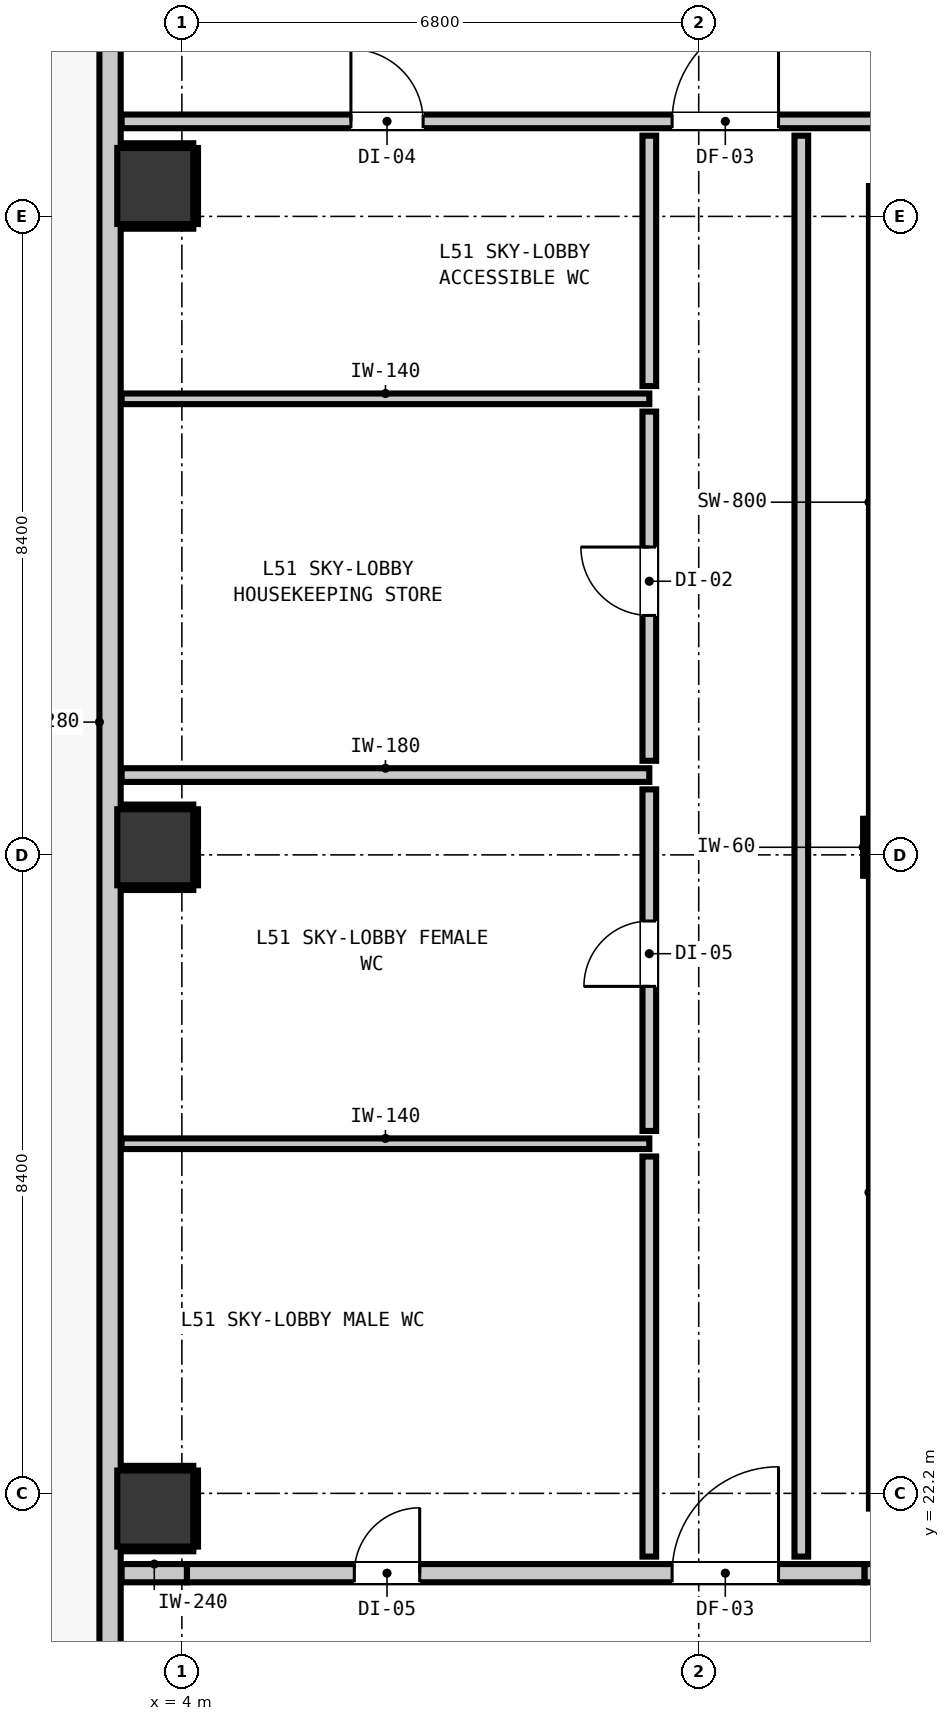
"""IFC4 building model, lengths in metres.
Left out: names, types, materials, properties, quantities, classifications, styles, units other than length and angle.
Written with IfcOpenShell. Run it as: python <this file> out.ifc"""

import sys

from ifc_helpers import new_model, si_unit, direction, frame, frame_2d, origin, origin_2d, place, context, subcontext, project, spatial, rectangle, extrude, element, fill, save


model = new_model("IFC4")
c1 = context("Model", 3, precision=1e-05, world=origin(), true_north=direction((0.0, 1.0)))
c2 = subcontext(c1, "Body", "Model", "MODEL_VIEW")
j1 = project(units=[si_unit("LENGTHUNIT", "METRE"), si_unit("PLANEANGLEUNIT", "RADIAN")], contexts=[c1])
p1 = place(None, origin())
s1 = spatial("IfcSite", under=j1, at=p1, CompositionType="ELEMENT")
p2 = place(p1, origin())
s2 = spatial("IfcBuilding", under=s1, at=p2, CompositionType="ELEMENT")
p3 = place(p2, frame((0.0, 0.0, 176.88)))
s3 = spatial("IfcBuildingStorey", under=s2, at=p3, CompositionType="ELEMENT", Elevation=176.88)
p4 = place(p3, frame((13.4, 30.7, 0.0), z_axis=(0.0, 0.0, 1.0), x_axis=(1.0, 0.0, 0.0)))
e1 = element("IfcColumn", 1, at=p4, inside=s3, PredefinedType="COLUMN", context=c2, shape_type="SweptSolid", body=[
    extrude(rectangle(XDim=0.75, YDim=0.75, at=origin_2d()), origin(), (0.0, 0.0, 1.0), 3.32),
])
p5 = place(p3, frame((13.44, 22.0, 0.0), z_axis=(0.0, 0.0, 1.0), x_axis=(0.0, 1.0, 0.0)))
e2 = element("IfcWall", 2, at=p5, inside=s3, PredefinedType="SHEAR", context=c2, shape_type="SweptSolid", body=[
    extrude(rectangle(XDim=8.32, YDim=0.8, at=frame_2d((4.16, 0.0))), origin(), (0.0, 0.0, 1.0), 3.32),
])
p6 = place(p3, frame((13.44, 31.08, 0.0), z_axis=(0.0, 0.0, 1.0), x_axis=(0.0, 1.0, 0.0)))
e3 = element("IfcWall", 3, at=p6, inside=s3, PredefinedType="SHEAR", context=c2, shape_type="SweptSolid", body=[
    extrude(rectangle(XDim=8.32, YDim=0.8, at=frame_2d((4.16, 0.0))), origin(), (0.0, 0.0, 1.0), 3.32),
])
for number, where, z_axis, x_axis in (
    (4, (3.65, 22.0, 0.0), (0.0, 0.0, 1.0), (1.0, 0.0, 0.0)),
    (5, (3.65, 30.7, 0.0), (0.0, 0.0, 1.0), (1.0, 0.0, 0.0)),
    (6, (3.65, 39.4, 0.0), (0.0, 0.0, 1.0), (1.0, 0.0, 0.0)),
):
    element("IfcColumn", number, at=place(p3, frame(where, z_axis=z_axis, x_axis=x_axis)), inside=s3, PredefinedType="COLUMN", context=c2, shape_type="SweptSolid", body=[
        extrude(rectangle(XDim=1.0, YDim=1.0, at=origin_2d()), origin(), (0.0, 0.0, 1.0), 3.32),
    ])
p7 = place(p3, frame((3.055, 17.555, 0.0), z_axis=(0.0, 0.0, 1.0), x_axis=(0.0, 1.0, 0.0)))
e7 = element("IfcWall", 7, at=p7, inside=s3, PredefinedType="STANDARD", context=c2, shape_type="SweptSolid", body=[
    extrude(rectangle(XDim=32.29, YDim=0.28, at=frame_2d((16.145, 0.0))), origin(), (0.0, 0.0, 1.0), 3.08),
])
p8 = place(p7, frame((29.684, 0.0, 0.0)))
e8 = element("IfcOpeningElement", 8, at=p8, cuts=e7, PredefinedType="OPENING", context=c2, shape_type="SweptSolid", body=[
    extrude(rectangle(XDim=1.0, YDim=2.15, at=frame_2d((0.5, 1.075))), frame((0.0, 0.15, 0.0), z_axis=(0.0, -1.0, 0.0), x_axis=(1.0, 0.0, 0.0)), (0.0, 0.0, 1.0), 0.3),
])
p9 = place(p7, frame((31.092, 0.0, 0.85)))
e9 = element("IfcOpeningElement", 9, at=p9, cuts=e7, PredefinedType="OPENING", context=c2, shape_type="SweptSolid", body=[
    extrude(rectangle(XDim=0.9, YDim=1.5, at=frame_2d((0.45, 0.75))), frame((0.0, 0.15, 0.0), z_axis=(0.0, -1.0, 0.0), x_axis=(1.0, 0.0, 0.0)), (0.0, 0.0, 1.0), 0.3),
])
p10 = place(p3, frame((3.207, 21.15, 0.0), z_axis=(0.0, 0.0, 1.0), x_axis=(1.0, 0.0, 0.0)))
e10 = element("IfcWall", 10, at=p10, inside=s3, PredefinedType="PARTITIONING", context=c2, shape_type="SweptSolid", body=[
    extrude(rectangle(XDim=0.86, YDim=0.24, at=frame_2d((0.43, 0.0))), origin(), (0.0, 0.0, 1.0), 3.08),
])
p11 = place(p3, frame((4.067, 21.15, 0.0), z_axis=(0.0, 0.0, 1.0), x_axis=(1.0, 0.0, 0.0)))
e11 = element("IfcWall", 11, at=p11, inside=s3, PredefinedType="PARTITIONING", context=c2, shape_type="SweptSolid", body=[
    extrude(rectangle(XDim=8.916, YDim=0.24, at=frame_2d((4.458, 0.0))), origin(), (0.0, 0.0, 1.0), 2.565),
])
p12 = place(p11, frame((6.383, 0.0, 0.0)))
e12 = element("IfcOpeningElement", 12, at=p12, cuts=e11, PredefinedType="OPENING", context=c2, shape_type="SweptSolid", body=[
    extrude(rectangle(XDim=1.4, YDim=2.15, at=frame_2d((0.7, 1.075))), frame((0.0, 0.13, 0.0), z_axis=(0.0, -1.0, 0.0), x_axis=(1.0, 0.0, 0.0)), (0.0, 0.0, 1.0), 0.26),
])
p13 = place(p11, frame((2.202, 0.0, 0.0)))
e13 = element("IfcOpeningElement", 13, at=p13, cuts=e11, PredefinedType="OPENING", context=c2, shape_type="SweptSolid", body=[
    extrude(rectangle(XDim=0.86, YDim=2.02, at=frame_2d((0.43, 1.01))), frame((0.0, 0.13, 0.0), z_axis=(0.0, -1.0, 0.0), x_axis=(1.0, 0.0, 0.0)), (0.0, 0.0, 1.0), 0.26),
])
p14 = place(p3, frame((12.983, 21.15, 0.0), z_axis=(0.0, 0.0, 1.0), x_axis=(1.0, 0.0, 0.0)))
e14 = element("IfcWall", 14, at=p14, inside=s3, PredefinedType="PARTITIONING", context=c2, shape_type="SweptSolid", body=[
    extrude(rectangle(XDim=29.61, YDim=0.24, at=frame_2d((14.805, 0.0))), origin(), (0.0, 0.0, 1.0), 3.08),
])
p15 = place(p14, frame((5.227, 0.0, 0.0)))
e15 = element("IfcOpeningElement", 15, at=p15, cuts=e14, PredefinedType="OPENING", context=c2, shape_type="SweptSolid", body=[
    extrude(rectangle(XDim=1.1, YDim=2.15, at=frame_2d((0.55, 1.075))), frame((0.0, 0.13, 0.0), z_axis=(0.0, -1.0, 0.0), x_axis=(1.0, 0.0, 0.0)), (0.0, 0.0, 1.0), 0.26),
])
p16 = place(p14, frame((27.638, 0.0, 0.0)))
e16 = element("IfcOpeningElement", 16, at=p16, cuts=e14, PredefinedType="OPENING", context=c2, shape_type="SweptSolid", body=[
    extrude(rectangle(XDim=0.9, YDim=2.1, at=frame_2d((0.45, 1.05))), frame((0.0, 0.13, 0.0), z_axis=(0.0, -1.0, 0.0), x_axis=(1.0, 0.0, 0.0)), (0.0, 0.0, 1.0), 0.26),
])
p17 = place(p3, frame((3.207, 31.65, 0.0), z_axis=(0.0, 0.0, 1.0), x_axis=(1.0, 0.0, 0.0)))
e17 = element("IfcWall", 17, at=p17, inside=s3, PredefinedType="PARTITIONING", context=c2, shape_type="SweptSolid", body=[
    extrude(rectangle(XDim=6.943, YDim=0.18, at=frame_2d((3.471, 0.0))), origin(), (0.0, 0.0, 1.0), 3.08),
])
p18 = place(p3, frame((3.207, 40.25, 0.0), z_axis=(0.0, 0.0, 1.0), x_axis=(1.0, 0.0, 0.0)))
e18 = element("IfcWall", 18, at=p18, inside=s3, PredefinedType="PARTITIONING", context=c2, shape_type="SweptSolid", body=[
    extrude(rectangle(XDim=39.386, YDim=0.18, at=frame_2d((19.693, 0.0))), origin(), (0.0, 0.0, 1.0), 3.08),
])
p19 = place(p18, frame((14.228, 0.0, 0.0)))
e19 = element("IfcOpeningElement", 19, at=p19, cuts=e18, PredefinedType="OPENING", context=c2, shape_type="SweptSolid", body=[
    extrude(rectangle(XDim=1.4, YDim=2.15, at=frame_2d((0.7, 1.075))), frame((0.0, 0.1, 0.0), z_axis=(0.0, -1.0, 0.0), x_axis=(1.0, 0.0, 0.0)), (0.0, 0.0, 1.0), 0.2),
])
p20 = place(p18, frame((7.243, 0.0, 0.0)))
e20 = element("IfcOpeningElement", 20, at=p20, cuts=e18, PredefinedType="OPENING", context=c2, shape_type="SweptSolid", body=[
    extrude(rectangle(XDim=1.4, YDim=2.15, at=frame_2d((0.7, 1.075))), frame((0.0, 0.1, 0.0), z_axis=(0.0, -1.0, 0.0), x_axis=(1.0, 0.0, 0.0)), (0.0, 0.0, 1.0), 0.2),
])
p21 = place(p18, frame((3.017, 0.0, 0.0)))
e21 = element("IfcOpeningElement", 21, at=p21, cuts=e18, PredefinedType="OPENING", context=c2, shape_type="SweptSolid", body=[
    extrude(rectangle(XDim=0.95, YDim=2.1, at=frame_2d((0.475, 1.05))), frame((0.0, 0.1, 0.0), z_axis=(0.0, -1.0, 0.0), x_axis=(1.0, 0.0, 0.0)), (0.0, 0.0, 1.0), 0.2),
])
for number, where, z_axis, x_axis in (
    (22, (3.207, 26.8, 0.0), (0.0, 0.0, 1.0), (1.0, 0.0, 0.0)),
    (23, (3.207, 36.6, 0.0), (0.0, 0.0, 1.0), (1.0, 0.0, 0.0)),
):
    element("IfcWall", number, at=place(p3, frame(where, z_axis=z_axis, x_axis=x_axis)), inside=s3, PredefinedType="PARTITIONING", context=c2, shape_type="SweptSolid", body=[
        extrude(rectangle(XDim=6.943, YDim=0.14, at=frame_2d((3.471, 0.0))), origin(), (0.0, 0.0, 1.0), 3.08),
    ])
p22 = place(p3, frame((10.15, 21.368, 0.0), z_axis=(0.0, 0.0, 1.0), x_axis=(0.0, 1.0, 0.0)))
e24 = element("IfcWall", 24, at=p22, inside=s3, PredefinedType="PARTITIONING", context=c2, shape_type="SweptSolid", body=[
    extrude(rectangle(XDim=5.264, YDim=0.18, at=frame_2d((2.632, 0.0))), origin(), (0.0, 0.0, 1.0), 3.08),
])
p23 = place(p3, frame((10.15, 26.968, 0.0), z_axis=(0.0, 0.0, 1.0), x_axis=(0.0, 1.0, 0.0)))
e25 = element("IfcWall", 25, at=p23, inside=s3, PredefinedType="PARTITIONING", context=c2, shape_type="SweptSolid", body=[
    extrude(rectangle(XDim=4.494, YDim=0.18, at=frame_2d((2.247, 0.0))), origin(), (0.0, 0.0, 1.0), 3.08),
])
p24 = place(p23, frame((1.902, 0.0, 0.0)))
e26 = element("IfcOpeningElement", 26, at=p24, cuts=e25, PredefinedType="OPENING", context=c2, shape_type="SweptSolid", body=[
    extrude(rectangle(XDim=0.86, YDim=2.02, at=frame_2d((0.43, 1.01))), frame((0.0, 0.1, 0.0), z_axis=(0.0, -1.0, 0.0), x_axis=(1.0, 0.0, 0.0)), (0.0, 0.0, 1.0), 0.2),
])
p25 = place(p3, frame((10.15, 31.838, 0.0), z_axis=(0.0, 0.0, 1.0), x_axis=(0.0, 1.0, 0.0)))
e27 = element("IfcWall", 27, at=p25, inside=s3, PredefinedType="PARTITIONING", context=c2, shape_type="SweptSolid", body=[
    extrude(rectangle(XDim=4.594, YDim=0.18, at=frame_2d((2.297, 0.0))), origin(), (0.0, 0.0, 1.0), 3.08),
])
p26 = place(p25, frame((1.912, 0.0, 0.0)))
e28 = element("IfcOpeningElement", 28, at=p26, cuts=e27, PredefinedType="OPENING", context=c2, shape_type="SweptSolid", body=[
    extrude(rectangle(XDim=0.9, YDim=2.1, at=frame_2d((0.45, 1.05))), frame((0.0, 0.1, 0.0), z_axis=(0.0, -1.0, 0.0), x_axis=(1.0, 0.0, 0.0)), (0.0, 0.0, 1.0), 0.2),
])
p27 = place(p3, frame((10.15, 36.768, 0.0), z_axis=(0.0, 0.0, 1.0), x_axis=(0.0, 1.0, 0.0)))
e29 = element("IfcWall", 29, at=p27, inside=s3, PredefinedType="PARTITIONING", context=c2, shape_type="SweptSolid", body=[
    extrude(rectangle(XDim=3.294, YDim=0.18, at=frame_2d((1.647, 0.0))), origin(), (0.0, 0.0, 1.0), 3.08),
])
p28 = place(p3, frame((12.15, 21.368, 0.0), z_axis=(0.0, 0.0, 1.0), x_axis=(0.0, 1.0, 0.0)))
e30 = element("IfcWall", 30, at=p28, inside=s3, PredefinedType="PARTITIONING", context=c2, shape_type="SweptSolid", body=[
    extrude(rectangle(XDim=18.694, YDim=0.18, at=frame_2d((9.347, 0.0))), origin(), (0.0, 0.0, 1.0), 3.08),
])
p29 = place(p3, frame((12.993, 30.325, 0.0), z_axis=(0.0, 0.0, 1.0), x_axis=(0.0, 1.0, 0.0)))
e31 = element("IfcWall", 31, at=p29, inside=s3, PredefinedType="PARTITIONING", context=c2, shape_type="SweptSolid", body=[
    extrude(rectangle(XDim=0.75, YDim=0.06, at=frame_2d((0.375, 0.0))), origin(), (0.0, 0.0, 1.0), 1.45),
])
for number, where, z_axis, x_axis in (
    (32, (3.21, 21.468, 0.0), (0.0, 0.0, 1.0), (1.0, 0.0, 0.0)),
    (33, (3.21, 22.532, 0.0), (0.0, 0.0, 1.0), (1.0, 0.0, 0.0)),
):
    element("IfcWall", number, at=place(p3, frame(where, z_axis=z_axis, x_axis=x_axis)), inside=s3, PredefinedType="PARTITIONING", context=c2, shape_type="SweptSolid", body=[
        extrude(rectangle(XDim=0.94, YDim=0.06, at=frame_2d((0.47, 0.0))), origin(), (0.0, 0.0, 1.0), 1.45),
    ])
p30 = place(p3, frame((4.182, 21.5, 0.0), z_axis=(0.0, 0.0, 1.0), x_axis=(0.0, 1.0, 0.0)))
e34 = element("IfcWall", 34, at=p30, inside=s3, PredefinedType="PARTITIONING", context=c2, shape_type="SweptSolid", body=[
    extrude(rectangle(XDim=1.0, YDim=0.06, at=frame_2d((0.5, 0.0))), origin(), (0.0, 0.0, 1.0), 1.45),
])
for number, where, z_axis, x_axis in (
    (35, (3.21, 30.168, 0.0), (0.0, 0.0, 1.0), (1.0, 0.0, 0.0)),
    (36, (3.21, 31.232, 0.0), (0.0, 0.0, 1.0), (1.0, 0.0, 0.0)),
):
    element("IfcWall", number, at=place(p3, frame(where, z_axis=z_axis, x_axis=x_axis)), inside=s3, PredefinedType="PARTITIONING", context=c2, shape_type="SweptSolid", body=[
        extrude(rectangle(XDim=0.94, YDim=0.06, at=frame_2d((0.47, 0.0))), origin(), (0.0, 0.0, 1.0), 1.45),
    ])
p31 = place(p3, frame((4.182, 30.2, 0.0), z_axis=(0.0, 0.0, 1.0), x_axis=(0.0, 1.0, 0.0)))
e37 = element("IfcWall", 37, at=p31, inside=s3, PredefinedType="PARTITIONING", context=c2, shape_type="SweptSolid", body=[
    extrude(rectangle(XDim=1.0, YDim=0.06, at=frame_2d((0.5, 0.0))), origin(), (0.0, 0.0, 1.0), 1.45),
])
for number, where, z_axis, x_axis in (
    (38, (3.21, 38.868, 0.0), (0.0, 0.0, 1.0), (1.0, 0.0, 0.0)),
    (39, (3.21, 39.932, 0.0), (0.0, 0.0, 1.0), (1.0, 0.0, 0.0)),
):
    element("IfcWall", number, at=place(p3, frame(where, z_axis=z_axis, x_axis=x_axis)), inside=s3, PredefinedType="PARTITIONING", context=c2, shape_type="SweptSolid", body=[
        extrude(rectangle(XDim=0.94, YDim=0.06, at=frame_2d((0.47, 0.0))), origin(), (0.0, 0.0, 1.0), 1.45),
    ])
p32 = place(p3, frame((4.182, 38.9, 0.0), z_axis=(0.0, 0.0, 1.0), x_axis=(0.0, 1.0, 0.0)))
e40 = element("IfcWall", 40, at=p32, inside=s3, PredefinedType="PARTITIONING", context=c2, shape_type="SweptSolid", body=[
    extrude(rectangle(XDim=1.0, YDim=0.06, at=frame_2d((0.5, 0.0))), origin(), (0.0, 0.0, 1.0), 1.45),
])
p33 = place(p12, origin())
e41 = element("IfcDoor", 41, at=p33, inside=s3, OperationType="SINGLE_SWING_RIGHT", PredefinedType="DOOR", context=c2, shape_type="SweptSolid", body=[
    extrude(rectangle(XDim=1.4, YDim=2.15, at=frame_2d((0.7, 1.075))), frame((0.0, 0.025, 0.0), z_axis=(0.0, -1.0, 0.0), x_axis=(1.0, 0.0, 0.0)), (0.0, 0.0, 1.0), 0.05),
])
fill(e12, e41)
p34 = place(p20, origin())
e42 = element("IfcDoor", 42, at=p34, inside=s3, OperationType="SINGLE_SWING_RIGHT", PredefinedType="DOOR", context=c2, shape_type="SweptSolid", body=[
    extrude(rectangle(XDim=1.4, YDim=2.15, at=frame_2d((0.7, 1.075))), frame((0.0, 0.025, 0.0), z_axis=(0.0, -1.0, 0.0), x_axis=(1.0, 0.0, 0.0)), (0.0, 0.0, 1.0), 0.05),
])
fill(e20, e42)
p35 = place(p13, origin())
e43 = element("IfcDoor", 43, at=p35, inside=s3, OperationType="SINGLE_SWING_RIGHT", PredefinedType="DOOR", context=c2, shape_type="SweptSolid", body=[
    extrude(rectangle(XDim=0.86, YDim=2.02, at=frame_2d((0.43, 1.01))), frame((0.0, 0.025, 0.0), z_axis=(0.0, -1.0, 0.0), x_axis=(1.0, 0.0, 0.0)), (0.0, 0.0, 1.0), 0.05),
])
fill(e13, e43)
p36 = place(p24, origin())
e44 = element("IfcDoor", 44, at=p36, inside=s3, OperationType="SINGLE_SWING_LEFT", PredefinedType="DOOR", context=c2, shape_type="SweptSolid", body=[
    extrude(rectangle(XDim=0.86, YDim=2.02, at=frame_2d((0.43, 1.01))), frame((0.0, 0.025, 0.0), z_axis=(0.0, -1.0, 0.0), x_axis=(1.0, 0.0, 0.0)), (0.0, 0.0, 1.0), 0.05),
])
fill(e26, e44)
p37 = place(p26, origin())
e45 = element("IfcDoor", 45, at=p37, inside=s3, OperationType="SINGLE_SWING_RIGHT", PredefinedType="DOOR", context=c2, shape_type="SweptSolid", body=[
    extrude(rectangle(XDim=0.9, YDim=2.1, at=frame_2d((0.45, 1.05))), frame((0.0, 0.025, 0.0), z_axis=(0.0, -1.0, 0.0), x_axis=(1.0, 0.0, 0.0)), (0.0, 0.0, 1.0), 0.05),
])
fill(e28, e45)
p38 = place(p21, origin())
e46 = element("IfcDoor", 46, at=p38, inside=s3, OperationType="SINGLE_SWING_LEFT", PredefinedType="DOOR", context=c2, shape_type="SweptSolid", body=[
    extrude(rectangle(XDim=0.95, YDim=2.1, at=frame_2d((0.475, 1.05))), frame((0.0, 0.025, 0.0), z_axis=(0.0, -1.0, 0.0), x_axis=(1.0, 0.0, 0.0)), (0.0, 0.0, 1.0), 0.05),
])
fill(e21, e46)
save(model, sys.argv[1])
